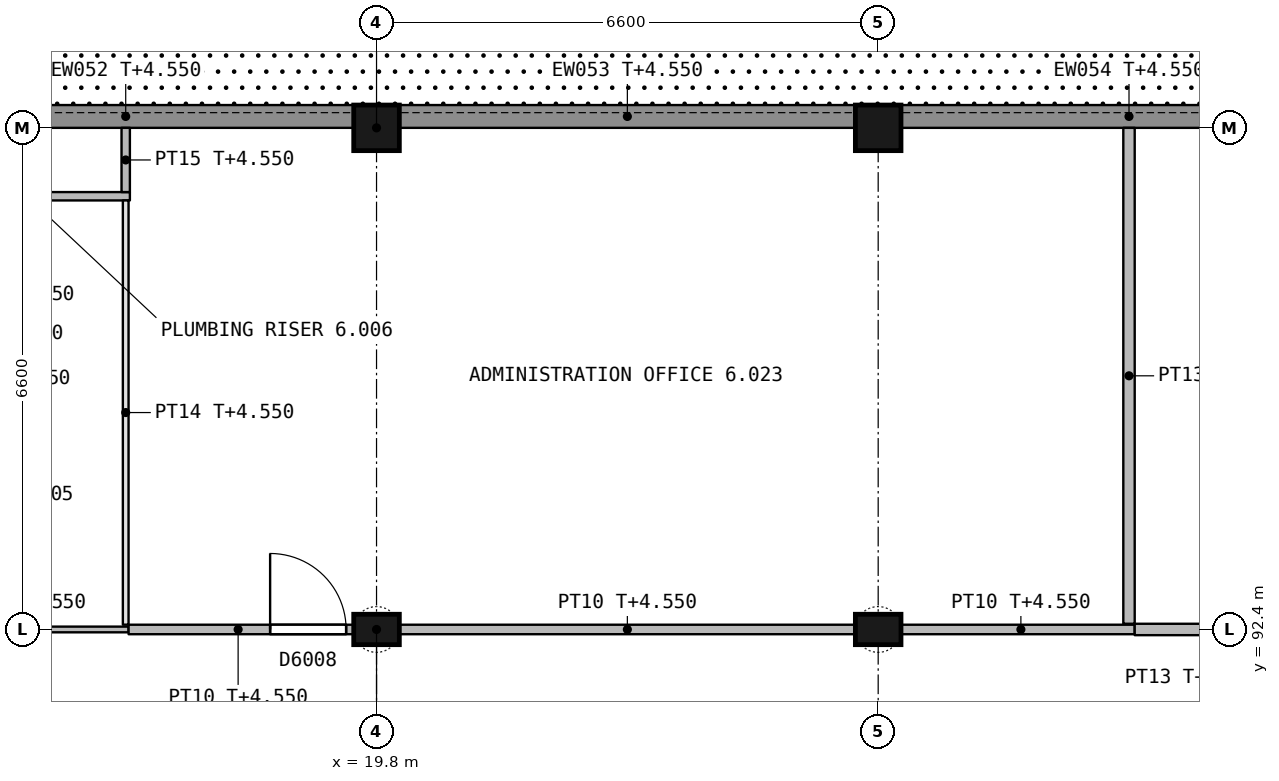
"""IFC4 building model, lengths in metres.
Left out: names, types, materials, properties, quantities, classifications, styles, units other than length and angle.
Written with IfcOpenShell. Run it as: python <this file> out.ifc"""

import sys

from ifc_helpers import new_model, si_unit, direction, frame, frame_2d, origin, origin_2d, place, context, subcontext, project, spatial, rectangle, extrude, element, fill, save


model = new_model("IFC4")
c1 = context("Model", 3, precision=1e-05, world=origin(), true_north=direction((0.0, 1.0)))
c2 = subcontext(c1, "Body", "Model", "MODEL_VIEW")
j1 = project(units=[si_unit("LENGTHUNIT", "METRE"), si_unit("PLANEANGLEUNIT", "RADIAN")], contexts=[c1])
p1 = place(None, origin())
s1 = spatial("IfcSite", under=j1, at=p1, CompositionType="ELEMENT")
p2 = place(p1, origin())
s2 = spatial("IfcBuilding", under=s1, at=p2, CompositionType="ELEMENT")
p3 = place(p2, origin())
s3 = spatial("IfcBuildingStorey", under=s2, at=p3, CompositionType="ELEMENT", Elevation=0.0)
p4 = place(p3, frame((19.8, 92.4, 0.0), z_axis=(0.0, 0.0, 1.0), x_axis=(1.0, 0.0, 0.0)))
e1 = element("IfcColumn", 1, at=p4, inside=s3, PredefinedType="COLUMN", context=c2, shape_type="SweptSolid", body=[
    extrude(rectangle(XDim=0.6, YDim=0.4, at=origin_2d()), origin(), (0.0, 0.0, 1.0), 5.4),
])
p5 = place(p3, frame((19.8, 99.0, 0.0), z_axis=(0.0, 0.0, 1.0), x_axis=(1.0, 0.0, 0.0)))
e2 = element("IfcColumn", 2, at=p5, inside=s3, PredefinedType="COLUMN", context=c2, shape_type="SweptSolid", body=[
    extrude(rectangle(XDim=0.6, YDim=0.6, at=origin_2d()), origin(), (0.0, 0.0, 1.0), 5.4),
])
p6 = place(p3, frame((26.4, 92.4, 0.0), z_axis=(0.0, 0.0, 1.0), x_axis=(1.0, 0.0, 0.0)))
e3 = element("IfcColumn", 3, at=p6, inside=s3, PredefinedType="COLUMN", context=c2, shape_type="SweptSolid", body=[
    extrude(rectangle(XDim=0.6, YDim=0.4, at=origin_2d()), origin(), (0.0, 0.0, 1.0), 5.4),
])
p7 = place(p3, frame((26.4, 99.0, 0.0), z_axis=(0.0, 0.0, 1.0), x_axis=(1.0, 0.0, 0.0)))
e4 = element("IfcColumn", 4, at=p7, inside=s3, PredefinedType="COLUMN", context=c2, shape_type="SweptSolid", body=[
    extrude(rectangle(XDim=0.6, YDim=0.6, at=origin_2d()), origin(), (0.0, 0.0, 1.0), 5.4),
])
for number, where, z_axis, x_axis in (
    (5, (13.5, 99.15, 0.0), (0.0, 0.0, 1.0), (1.0, 0.0, 0.0)),
    (6, (20.1, 99.15, 0.0), (0.0, 0.0, 1.0), (1.0, 0.0, 0.0)),
    (7, (26.7, 99.15, 0.0), (0.0, 0.0, 1.0), (1.0, 0.0, 0.0)),
):
    element("IfcWall", number, at=place(p3, frame(where, z_axis=z_axis, x_axis=x_axis)), inside=s3, PredefinedType="STANDARD", context=c2, shape_type="SweptSolid", body=[
        extrude(rectangle(XDim=6.0, YDim=0.3, at=frame_2d((3.0, 0.0))), origin(), (0.0, 0.0, 1.0), 4.55),
    ])
p8 = place(p3, frame((13.5, 92.4, 0.0), z_axis=(0.0, 0.0, 1.0), x_axis=(1.0, 0.0, 0.0)))
e8 = element("IfcWall", 8, at=p8, inside=s3, PredefinedType="PARTITIONING", context=c2, shape_type="SweptSolid", body=[
    extrude(rectangle(XDim=3.038, YDim=0.075, at=frame_2d((1.519, 0.0))), origin(), (0.0, 0.0, 1.0), 4.55),
])
p9 = place(p3, frame((16.538, 92.4, 0.0), z_axis=(0.0, 0.0, 1.0), x_axis=(1.0, 0.0, 0.0)))
e9 = element("IfcWall", 9, at=p9, inside=s3, PredefinedType="PARTITIONING", context=c2, shape_type="SweptSolid", body=[
    extrude(rectangle(XDim=2.962, YDim=0.125, at=frame_2d((1.481, 0.0))), origin(), (0.0, 0.0, 1.0), 4.55),
])
p10 = place(p9, frame((1.862, 0.0, 0.0)))
e10 = element("IfcOpeningElement", 10, at=p10, cuts=e9, PredefinedType="OPENING", context=c2, shape_type="SweptSolid", body=[
    extrude(rectangle(XDim=1.0, YDim=2.1, at=frame_2d((0.5, 1.05))), frame((0.0, 0.073, 0.0), z_axis=(0.0, -1.0, 0.0), x_axis=(1.0, 0.0, 0.0)), (0.0, 0.0, 1.0), 0.145),
])
p11 = place(p3, frame((20.1, 92.4, 0.0), z_axis=(0.0, 0.0, 1.0), x_axis=(1.0, 0.0, 0.0)))
e11 = element("IfcWall", 11, at=p11, inside=s3, PredefinedType="PARTITIONING", context=c2, shape_type="SweptSolid", body=[
    extrude(rectangle(XDim=6.0, YDim=0.125, at=frame_2d((3.0, 0.0))), origin(), (0.0, 0.0, 1.0), 4.55),
])
p12 = place(p3, frame((26.7, 92.4, 0.0), z_axis=(0.0, 0.0, 1.0), x_axis=(1.0, 0.0, 0.0)))
e12 = element("IfcWall", 12, at=p12, inside=s3, PredefinedType="PARTITIONING", context=c2, shape_type="SweptSolid", body=[
    extrude(rectangle(XDim=3.075, YDim=0.125, at=frame_2d((1.538, 0.0))), origin(), (0.0, 0.0, 1.0), 4.55),
])
p13 = place(p3, frame((29.775, 92.4, 0.0), z_axis=(0.0, 0.0, 1.0), x_axis=(1.0, 0.0, 0.0)))
e13 = element("IfcWall", 13, at=p13, inside=s3, PredefinedType="PARTITIONING", context=c2, shape_type="SweptSolid", body=[
    extrude(rectangle(XDim=2.925, YDim=0.15, at=frame_2d((1.462, 0.0))), origin(), (0.0, 0.0, 1.0), 4.55),
])
p14 = place(p13, frame((1.925, 0.0, 0.0)))
e14 = element("IfcOpeningElement", 14, at=p14, cuts=e13, PredefinedType="OPENING", context=c2, shape_type="SweptSolid", body=[
    extrude(rectangle(XDim=0.9, YDim=2.1, at=frame_2d((0.45, 1.05))), frame((0.0, 0.085, 0.0), z_axis=(0.0, -1.0, 0.0), x_axis=(1.0, 0.0, 0.0)), (0.0, 0.0, 1.0), 0.17),
])
p15 = place(p3, frame((16.555, 98.1, 0.0), z_axis=(0.0, 0.0, 1.0), x_axis=(-1.0, 0.0, 0.0)))
e15 = element("IfcWall", 15, at=p15, inside=s3, PredefinedType="PARTITIONING", context=c2, shape_type="SweptSolid", body=[
    extrude(rectangle(XDim=3.3, YDim=0.11, at=frame_2d((1.65, 0.0))), origin(), (0.0, 0.0, 1.0), 4.45),
])
p16 = place(p15, frame((1.405, 0.0, 0.0)))
e16 = element("IfcOpeningElement", 16, at=p16, cuts=e15, PredefinedType="OPENING", context=c2, shape_type="SweptSolid", body=[
    extrude(rectangle(XDim=0.6, YDim=2.1, at=frame_2d((0.3, 1.05))), frame((0.0, 0.065, 0.0), z_axis=(0.0, -1.0, 0.0), x_axis=(1.0, 0.0, 0.0)), (0.0, 0.0, 1.0), 0.13),
])
p17 = place(p3, frame((16.5, 92.463, 0.0), z_axis=(0.0, 0.0, 1.0), x_axis=(0.0, 1.0, 0.0)))
e17 = element("IfcWall", 17, at=p17, inside=s3, PredefinedType="PARTITIONING", context=c2, shape_type="SweptSolid", body=[
    extrude(rectangle(XDim=5.582, YDim=0.075, at=frame_2d((2.791, 0.0))), origin(), (0.0, 0.0, 1.0), 4.55),
])
p18 = place(p3, frame((16.5, 98.155, 0.0), z_axis=(0.0, 0.0, 1.0), x_axis=(0.0, 1.0, 0.0)))
e18 = element("IfcWall", 18, at=p18, inside=s3, PredefinedType="PARTITIONING", context=c2, shape_type="SweptSolid", body=[
    extrude(rectangle(XDim=0.845, YDim=0.11, at=frame_2d((0.422, 0.0))), origin(), (0.0, 0.0, 1.0), 4.55),
])
p19 = place(p3, frame((29.7, 92.475, 0.0), z_axis=(0.0, 0.0, 1.0), x_axis=(0.0, 1.0, 0.0)))
e19 = element("IfcWall", 19, at=p19, inside=s3, PredefinedType="PARTITIONING", context=c2, shape_type="SweptSolid", body=[
    extrude(rectangle(XDim=6.525, YDim=0.15, at=frame_2d((3.262, 0.0))), origin(), (0.0, 0.0, 1.0), 4.55),
])
p20 = place(p10, origin())
e20 = element("IfcDoor", 20, at=p20, inside=s3, OperationType="SINGLE_SWING_LEFT", PredefinedType="DOOR", context=c2, shape_type="SweptSolid", body=[
    extrude(rectangle(XDim=1.0, YDim=2.1, at=frame_2d((0.5, 1.05))), frame((0.0, 0.025, 0.0), z_axis=(0.0, -1.0, 0.0), x_axis=(1.0, 0.0, 0.0)), (0.0, 0.0, 1.0), 0.05),
])
fill(e10, e20)
save(model, sys.argv[1])
